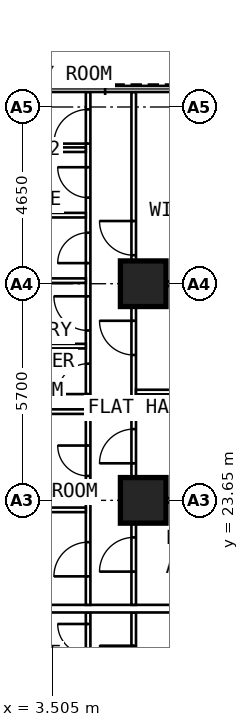
"""IFC4 building model, lengths in metres.
Left out: names, types, materials, properties, quantities, classifications, styles, units other than length and angle.
Written with IfcOpenShell. Run it as: python <this file> out.ifc"""

import sys

from ifc_helpers import new_model, si_unit, direction, frame, frame_2d, origin, origin_2d, place, context, subcontext, project, spatial, rectangle, extrude, element, fill, save


model = new_model("IFC4")
c1 = context("Model", 3, precision=1e-05, world=origin(), true_north=direction((0.0, 1.0)))
c2 = subcontext(c1, "Body", "Model", "MODEL_VIEW")
j1 = project(units=[si_unit("LENGTHUNIT", "METRE"), si_unit("PLANEANGLEUNIT", "RADIAN")], contexts=[c1])
p1 = place(None, origin())
s1 = spatial("IfcSite", under=j1, at=p1, CompositionType="ELEMENT")
p2 = place(p1, origin())
s2 = spatial("IfcBuilding", under=s1, at=p2, CompositionType="ELEMENT")
p3 = place(p2, frame((0.0, 0.0, 80.8)))
s3 = spatial("IfcBuildingStorey", under=s2, at=p3, CompositionType="ELEMENT", Elevation=80.8)
for number, where, z_axis, x_axis in (
    (1, (5.9, 23.65, 0.0), (0.0, 0.0, 1.0), (0.0, 1.0, 0.0)),
    (2, (5.9, 29.35, 0.0), (0.0, 0.0, 1.0), (0.0, 1.0, 0.0)),
):
    element("IfcColumn", number, at=place(p3, frame(where, z_axis=z_axis, x_axis=x_axis)), inside=s3, PredefinedType="COLUMN", context=c2, shape_type="SweptSolid", body=[
        extrude(rectangle(XDim=1.2, YDim=1.2, at=origin_2d()), origin(), (0.0, 0.0, 1.0), 3.6),
    ])
p4 = place(p3, frame((4.45, 10.1, 0.0), z_axis=(0.0, 0.0, 1.0), x_axis=(0.0, 1.0, 0.0)))
e3 = element("IfcWall", 3, at=p4, inside=s3, PredefinedType="PARTITIONING", context=c2, shape_type="SweptSolid", body=[
    extrude(rectangle(XDim=10.6, YDim=0.12, at=frame_2d((5.3, 0.0))), origin(), (0.0, 0.0, 1.0), 3.35),
])
p5 = place(p4, frame((1.59, 0.0, 0.0)))
e4 = element("IfcOpeningElement", 4, at=p5, cuts=e3, PredefinedType="OPENING", context=c2, shape_type="SweptSolid", body=[
    extrude(rectangle(XDim=0.8, YDim=2.1, at=frame_2d((0.4, 1.05))), frame((0.0, 0.072, 0.0), z_axis=(0.0, -1.0, 0.0), x_axis=(1.0, 0.0, 0.0)), (0.0, 0.0, 1.0), 0.144),
])
p6 = place(p4, frame((3.53, 0.0, 0.0)))
e5 = element("IfcOpeningElement", 5, at=p6, cuts=e3, PredefinedType="OPENING", context=c2, shape_type="SweptSolid", body=[
    extrude(rectangle(XDim=0.9, YDim=2.1, at=frame_2d((0.45, 1.05))), frame((0.0, 0.072, 0.0), z_axis=(0.0, -1.0, 0.0), x_axis=(1.0, 0.0, 0.0)), (0.0, 0.0, 1.0), 0.144),
])
p7 = place(p4, frame((5.884, 0.0, 0.0)))
e6 = element("IfcOpeningElement", 6, at=p7, cuts=e3, PredefinedType="OPENING", context=c2, shape_type="SweptSolid", body=[
    extrude(rectangle(XDim=0.8, YDim=2.1, at=frame_2d((0.4, 1.05))), frame((0.0, 0.072, 0.0), z_axis=(0.0, -1.0, 0.0), x_axis=(1.0, 0.0, 0.0)), (0.0, 0.0, 1.0), 0.144),
])
p8 = place(p4, frame((7.842, 0.0, 0.0)))
e7 = element("IfcOpeningElement", 7, at=p8, cuts=e3, PredefinedType="OPENING", context=c2, shape_type="SweptSolid", body=[
    extrude(rectangle(XDim=0.9, YDim=2.1, at=frame_2d((0.45, 1.05))), frame((0.0, 0.072, 0.0), z_axis=(0.0, -1.0, 0.0), x_axis=(1.0, 0.0, 0.0)), (0.0, 0.0, 1.0), 0.144),
])
p9 = place(p4, frame((9.497, 0.0, 0.0)))
e8 = element("IfcOpeningElement", 8, at=p9, cuts=e3, PredefinedType="OPENING", context=c2, shape_type="SweptSolid", body=[
    extrude(rectangle(XDim=0.8, YDim=2.1, at=frame_2d((0.4, 1.05))), frame((0.0, 0.072, 0.0), z_axis=(0.0, -1.0, 0.0), x_axis=(1.0, 0.0, 0.0)), (0.0, 0.0, 1.0), 0.144),
])
p10 = place(p3, frame((5.65, 9.6, 0.0), z_axis=(0.0, 0.0, 1.0), x_axis=(0.0, 1.0, 0.0)))
e9 = element("IfcWall", 9, at=p10, inside=s3, PredefinedType="PARTITIONING", context=c2, shape_type="SweptSolid", body=[
    extrude(rectangle(XDim=11.1, YDim=0.12, at=frame_2d((5.55, 0.0))), origin(), (0.0, 0.0, 1.0), 3.35),
])
p11 = place(p10, frame((1.0, 0.0, 0.0)))
e10 = element("IfcOpeningElement", 10, at=p11, cuts=e9, PredefinedType="OPENING", context=c2, shape_type="SweptSolid", body=[
    extrude(rectangle(XDim=0.9, YDim=2.1, at=frame_2d((0.45, 1.05))), frame((0.0, 0.072, 0.0), z_axis=(0.0, -1.0, 0.0), x_axis=(1.0, 0.0, 0.0)), (0.0, 0.0, 1.0), 0.144),
])
p12 = place(p10, frame((3.625, 0.0, 0.0)))
e11 = element("IfcOpeningElement", 11, at=p12, cuts=e9, PredefinedType="OPENING", context=c2, shape_type="SweptSolid", body=[
    extrude(rectangle(XDim=0.9, YDim=2.1, at=frame_2d((0.45, 1.05))), frame((0.0, 0.072, 0.0), z_axis=(0.0, -1.0, 0.0), x_axis=(1.0, 0.0, 0.0)), (0.0, 0.0, 1.0), 0.144),
])
p13 = place(p10, frame((6.475, 0.0, 0.0)))
e12 = element("IfcOpeningElement", 12, at=p13, cuts=e9, PredefinedType="OPENING", context=c2, shape_type="SweptSolid", body=[
    extrude(rectangle(XDim=0.9, YDim=2.1, at=frame_2d((0.45, 1.05))), frame((0.0, 0.072, 0.0), z_axis=(0.0, -1.0, 0.0), x_axis=(1.0, 0.0, 0.0)), (0.0, 0.0, 1.0), 0.144),
])
p14 = place(p10, frame((9.325, 0.0, 0.0)))
e13 = element("IfcOpeningElement", 13, at=p14, cuts=e9, PredefinedType="OPENING", context=c2, shape_type="SweptSolid", body=[
    extrude(rectangle(XDim=0.9, YDim=2.1, at=frame_2d((0.45, 1.05))), frame((0.0, 0.072, 0.0), z_axis=(0.0, -1.0, 0.0), x_axis=(1.0, 0.0, 0.0)), (0.0, 0.0, 1.0), 0.144),
])
p15 = place(p3, frame((4.45, 20.9, 0.0), z_axis=(0.0, 0.0, 1.0), x_axis=(0.0, 1.0, 0.0)))
e14 = element("IfcWall", 14, at=p15, inside=s3, PredefinedType="PARTITIONING", context=c2, shape_type="SweptSolid", body=[
    extrude(rectangle(XDim=13.495, YDim=0.12, at=frame_2d((6.748, 0.0))), origin(), (0.0, 0.0, 1.0), 3.35),
])
p16 = place(p15, frame((0.75, 0.0, 0.0)))
e15 = element("IfcOpeningElement", 15, at=p16, cuts=e14, PredefinedType="OPENING", context=c2, shape_type="SweptSolid", body=[
    extrude(rectangle(XDim=0.9, YDim=2.1, at=frame_2d((0.45, 1.05))), frame((0.0, 0.072, 0.0), z_axis=(0.0, -1.0, 0.0), x_axis=(1.0, 0.0, 0.0)), (0.0, 0.0, 1.0), 0.144),
])
p17 = place(p15, frame((3.392, 0.0, 0.0)))
e16 = element("IfcOpeningElement", 16, at=p17, cuts=e14, PredefinedType="OPENING", context=c2, shape_type="SweptSolid", body=[
    extrude(rectangle(XDim=0.8, YDim=2.1, at=frame_2d((0.4, 1.05))), frame((0.0, 0.072, 0.0), z_axis=(0.0, -1.0, 0.0), x_axis=(1.0, 0.0, 0.0)), (0.0, 0.0, 1.0), 0.144),
])
p18 = place(p15, frame((5.546, 0.0, 0.0)))
e17 = element("IfcOpeningElement", 17, at=p18, cuts=e14, PredefinedType="OPENING", context=c2, shape_type="SweptSolid", body=[
    extrude(rectangle(XDim=0.8, YDim=2.1, at=frame_2d((0.4, 1.05))), frame((0.0, 0.072, 0.0), z_axis=(0.0, -1.0, 0.0), x_axis=(1.0, 0.0, 0.0)), (0.0, 0.0, 1.0), 0.144),
])
p19 = place(p15, frame((7.219, 0.0, 0.0)))
e18 = element("IfcOpeningElement", 18, at=p19, cuts=e14, PredefinedType="OPENING", context=c2, shape_type="SweptSolid", body=[
    extrude(rectangle(XDim=0.9, YDim=2.1, at=frame_2d((0.45, 1.05))), frame((0.0, 0.072, 0.0), z_axis=(0.0, -1.0, 0.0), x_axis=(1.0, 0.0, 0.0)), (0.0, 0.0, 1.0), 0.144),
])
p20 = place(p15, frame((8.992, 0.0, 0.0)))
e19 = element("IfcOpeningElement", 19, at=p20, cuts=e14, PredefinedType="OPENING", context=c2, shape_type="SweptSolid", body=[
    extrude(rectangle(XDim=0.8, YDim=2.1, at=frame_2d((0.4, 1.05))), frame((0.0, 0.072, 0.0), z_axis=(0.0, -1.0, 0.0), x_axis=(1.0, 0.0, 0.0)), (0.0, 0.0, 1.0), 0.144),
])
p21 = place(p15, frame((10.715, 0.0, 0.0)))
e20 = element("IfcOpeningElement", 20, at=p21, cuts=e14, PredefinedType="OPENING", context=c2, shape_type="SweptSolid", body=[
    extrude(rectangle(XDim=0.8, YDim=2.1, at=frame_2d((0.4, 1.05))), frame((0.0, 0.072, 0.0), z_axis=(0.0, -1.0, 0.0), x_axis=(1.0, 0.0, 0.0)), (0.0, 0.0, 1.0), 0.144),
])
p22 = place(p15, frame((12.137, 0.0, 0.0)))
e21 = element("IfcOpeningElement", 21, at=p22, cuts=e14, PredefinedType="OPENING", context=c2, shape_type="SweptSolid", body=[
    extrude(rectangle(XDim=0.9, YDim=2.1, at=frame_2d((0.45, 1.05))), frame((0.0, 0.072, 0.0), z_axis=(0.0, -1.0, 0.0), x_axis=(1.0, 0.0, 0.0)), (0.0, 0.0, 1.0), 0.144),
])
p23 = place(p3, frame((5.65, 20.9, 0.0), z_axis=(0.0, 0.0, 1.0), x_axis=(0.0, 1.0, 0.0)))
e22 = element("IfcWall", 22, at=p23, inside=s3, PredefinedType="PARTITIONING", context=c2, shape_type="SweptSolid", body=[
    extrude(rectangle(XDim=13.495, YDim=0.12, at=frame_2d((6.748, 0.0))), origin(), (0.0, 0.0, 1.0), 3.35),
])
p24 = place(p23, frame((0.875, 0.0, 0.0)))
e23 = element("IfcOpeningElement", 23, at=p24, cuts=e22, PredefinedType="OPENING", context=c2, shape_type="SweptSolid", body=[
    extrude(rectangle(XDim=0.9, YDim=2.1, at=frame_2d((0.45, 1.05))), frame((0.0, 0.072, 0.0), z_axis=(0.0, -1.0, 0.0), x_axis=(1.0, 0.0, 0.0)), (0.0, 0.0, 1.0), 0.144),
])
p25 = place(p23, frame((3.725, 0.0, 0.0)))
e24 = element("IfcOpeningElement", 24, at=p25, cuts=e22, PredefinedType="OPENING", context=c2, shape_type="SweptSolid", body=[
    extrude(rectangle(XDim=0.9, YDim=2.1, at=frame_2d((0.45, 1.05))), frame((0.0, 0.072, 0.0), z_axis=(0.0, -1.0, 0.0), x_axis=(1.0, 0.0, 0.0)), (0.0, 0.0, 1.0), 0.144),
])
p26 = place(p23, frame((6.575, 0.0, 0.0)))
e25 = element("IfcOpeningElement", 25, at=p26, cuts=e22, PredefinedType="OPENING", context=c2, shape_type="SweptSolid", body=[
    extrude(rectangle(XDim=0.9, YDim=2.1, at=frame_2d((0.45, 1.05))), frame((0.0, 0.072, 0.0), z_axis=(0.0, -1.0, 0.0), x_axis=(1.0, 0.0, 0.0)), (0.0, 0.0, 1.0), 0.144),
])
p27 = place(p23, frame((9.2, 0.0, 0.0)))
e26 = element("IfcOpeningElement", 26, at=p27, cuts=e22, PredefinedType="OPENING", context=c2, shape_type="SweptSolid", body=[
    extrude(rectangle(XDim=0.9, YDim=2.1, at=frame_2d((0.45, 1.05))), frame((0.0, 0.072, 0.0), z_axis=(0.0, -1.0, 0.0), x_axis=(1.0, 0.0, 0.0)), (0.0, 0.0, 1.0), 0.144),
])
p28 = place(p3, frame((5.71, 23.65, 0.0), z_axis=(0.0, 0.0, 1.0), x_axis=(1.0, 0.0, 0.0)))
e27 = element("IfcWall", 27, at=p28, inside=s3, PredefinedType="PARTITIONING", context=c2, shape_type="SweptSolid", body=[
    extrude(rectangle(XDim=4.99, YDim=0.12, at=frame_2d((2.495, 0.0))), origin(), (0.0, 0.0, 1.0), 2.45),
])
p29 = place(p3, frame((5.71, 26.5, 0.0), z_axis=(0.0, 0.0, 1.0), x_axis=(1.0, 0.0, 0.0)))
e28 = element("IfcWall", 28, at=p29, inside=s3, PredefinedType="PARTITIONING", context=c2, shape_type="SweptSolid", body=[
    extrude(rectangle(XDim=4.99, YDim=0.12, at=frame_2d((2.495, 0.0))), origin(), (0.0, 0.0, 1.0), 3.35),
])
p30 = place(p3, frame((5.71, 29.35, 0.0), z_axis=(0.0, 0.0, 1.0), x_axis=(1.0, 0.0, 0.0)))
e29 = element("IfcWall", 29, at=p30, inside=s3, PredefinedType="PARTITIONING", context=c2, shape_type="SweptSolid", body=[
    extrude(rectangle(XDim=4.99, YDim=0.12, at=frame_2d((2.495, 0.0))), origin(), (0.0, 0.0, 1.0), 2.45),
])
p31 = place(p3, frame((2.1, 23.4, 0.0), z_axis=(0.0, 0.0, 1.0), x_axis=(1.0, 0.0, 0.0)))
e30 = element("IfcWall", 30, at=p31, inside=s3, PredefinedType="PARTITIONING", context=c2, shape_type="SweptSolid", body=[
    extrude(rectangle(XDim=2.29, YDim=0.12, at=frame_2d((1.145, 0.0))), origin(), (0.0, 0.0, 1.0), 2.45),
])
for number, where, z_axis, x_axis in (
    (31, (2.1, 25.985, 0.0), (0.0, 0.0, 1.0), (1.0, 0.0, 0.0)),
    (32, (2.1, 27.708, 0.0), (0.0, 0.0, 1.0), (1.0, 0.0, 0.0)),
):
    element("IfcWall", number, at=place(p3, frame(where, z_axis=z_axis, x_axis=x_axis)), inside=s3, PredefinedType="PARTITIONING", context=c2, shape_type="SweptSolid", body=[
        extrude(rectangle(XDim=2.29, YDim=0.12, at=frame_2d((1.145, 0.0))), origin(), (0.0, 0.0, 1.0), 3.35),
    ])
p32 = place(p3, frame((2.1, 29.431, 0.0), z_axis=(0.0, 0.0, 1.0), x_axis=(1.0, 0.0, 0.0)))
e33 = element("IfcWall", 33, at=p32, inside=s3, PredefinedType="PARTITIONING", context=c2, shape_type="SweptSolid", body=[
    extrude(rectangle(XDim=2.29, YDim=0.12, at=frame_2d((1.145, 0.0))), origin(), (0.0, 0.0, 1.0), 2.45),
])
for number, where, z_axis, x_axis in (
    (34, (2.1, 31.154, 0.0), (0.0, 0.0, 1.0), (1.0, 0.0, 0.0)),
    (35, (2.1, 32.877, 0.0), (0.0, 0.0, 1.0), (1.0, 0.0, 0.0)),
):
    element("IfcWall", number, at=place(p3, frame(where, z_axis=z_axis, x_axis=x_axis)), inside=s3, PredefinedType="PARTITIONING", context=c2, shape_type="SweptSolid", body=[
        extrude(rectangle(XDim=2.29, YDim=0.12, at=frame_2d((1.145, 0.0))), origin(), (0.0, 0.0, 1.0), 3.35),
    ])
p33 = place(p3, frame((2.1, 20.8, 0.0), z_axis=(0.0, 0.0, 1.0), x_axis=(1.0, 0.0, 0.0)))
e36 = element("IfcWall", 36, at=p33, inside=s3, PredefinedType="PARTITIONING", context=c2, shape_type="SweptSolid", body=[
    extrude(rectangle(XDim=8.6, YDim=0.2, at=frame_2d((4.3, 0.0))), origin(), (0.0, 0.0, 1.0), 3.35),
])
p34 = place(p14, origin())
e37 = element("IfcDoor", 37, at=p34, inside=s3, OperationType="SINGLE_SWING_RIGHT", PredefinedType="DOOR", context=c2, shape_type="SweptSolid", body=[
    extrude(rectangle(XDim=0.9, YDim=2.1, at=frame_2d((0.45, 1.05))), frame((0.0, 0.025, 0.0), z_axis=(0.0, -1.0, 0.0), x_axis=(1.0, 0.0, 0.0)), (0.0, 0.0, 1.0), 0.05),
])
fill(e13, e37)
p35 = place(p9, origin())
e38 = element("IfcDoor", 38, at=p35, inside=s3, OperationType="SINGLE_SWING_RIGHT", PredefinedType="DOOR", context=c2, shape_type="SweptSolid", body=[
    extrude(rectangle(XDim=0.8, YDim=2.1, at=frame_2d((0.4, 1.05))), frame((0.0, 0.025, 0.0), z_axis=(0.0, -1.0, 0.0), x_axis=(1.0, 0.0, 0.0)), (0.0, 0.0, 1.0), 0.05),
])
fill(e8, e38)
p36 = place(p24, origin())
e39 = element("IfcDoor", 39, at=p36, inside=s3, OperationType="SINGLE_SWING_LEFT", PredefinedType="DOOR", context=c2, shape_type="SweptSolid", body=[
    extrude(rectangle(XDim=0.9, YDim=2.1, at=frame_2d((0.45, 1.05))), frame((0.0, 0.025, 0.0), z_axis=(0.0, -1.0, 0.0), x_axis=(1.0, 0.0, 0.0)), (0.0, 0.0, 1.0), 0.05),
])
fill(e23, e39)
p37 = place(p25, origin())
e40 = element("IfcDoor", 40, at=p37, inside=s3, OperationType="SINGLE_SWING_LEFT", PredefinedType="DOOR", context=c2, shape_type="SweptSolid", body=[
    extrude(rectangle(XDim=0.9, YDim=2.1, at=frame_2d((0.45, 1.05))), frame((0.0, 0.025, 0.0), z_axis=(0.0, -1.0, 0.0), x_axis=(1.0, 0.0, 0.0)), (0.0, 0.0, 1.0), 0.05),
])
fill(e24, e40)
p38 = place(p26, origin())
e41 = element("IfcDoor", 41, at=p38, inside=s3, OperationType="SINGLE_SWING_RIGHT", PredefinedType="DOOR", context=c2, shape_type="SweptSolid", body=[
    extrude(rectangle(XDim=0.9, YDim=2.1, at=frame_2d((0.45, 1.05))), frame((0.0, 0.025, 0.0), z_axis=(0.0, -1.0, 0.0), x_axis=(1.0, 0.0, 0.0)), (0.0, 0.0, 1.0), 0.05),
])
fill(e25, e41)
p39 = place(p27, origin())
e42 = element("IfcDoor", 42, at=p39, inside=s3, OperationType="SINGLE_SWING_RIGHT", PredefinedType="DOOR", context=c2, shape_type="SweptSolid", body=[
    extrude(rectangle(XDim=0.9, YDim=2.1, at=frame_2d((0.45, 1.05))), frame((0.0, 0.025, 0.0), z_axis=(0.0, -1.0, 0.0), x_axis=(1.0, 0.0, 0.0)), (0.0, 0.0, 1.0), 0.05),
])
fill(e26, e42)
p40 = place(p16, origin())
e43 = element("IfcDoor", 43, at=p40, inside=s3, OperationType="SINGLE_SWING_LEFT", PredefinedType="DOOR", context=c2, shape_type="SweptSolid", body=[
    extrude(rectangle(XDim=0.9, YDim=2.1, at=frame_2d((0.45, 1.05))), frame((0.0, 0.025, 0.0), z_axis=(0.0, -1.0, 0.0), x_axis=(1.0, 0.0, 0.0)), (0.0, 0.0, 1.0), 0.05),
])
fill(e15, e43)
p41 = place(p17, origin())
e44 = element("IfcDoor", 44, at=p41, inside=s3, OperationType="SINGLE_SWING_RIGHT", PredefinedType="DOOR", context=c2, shape_type="SweptSolid", body=[
    extrude(rectangle(XDim=0.8, YDim=2.1, at=frame_2d((0.4, 1.05))), frame((0.0, 0.025, 0.0), z_axis=(0.0, -1.0, 0.0), x_axis=(1.0, 0.0, 0.0)), (0.0, 0.0, 1.0), 0.05),
])
fill(e16, e44)
p42 = place(p18, origin())
e45 = element("IfcDoor", 45, at=p42, inside=s3, OperationType="SINGLE_SWING_LEFT", PredefinedType="DOOR", context=c2, shape_type="SweptSolid", body=[
    extrude(rectangle(XDim=0.8, YDim=2.1, at=frame_2d((0.4, 1.05))), frame((0.0, 0.025, 0.0), z_axis=(0.0, -1.0, 0.0), x_axis=(1.0, 0.0, 0.0)), (0.0, 0.0, 1.0), 0.05),
])
fill(e17, e45)
p43 = place(p19, origin())
e46 = element("IfcDoor", 46, at=p43, inside=s3, OperationType="SINGLE_SWING_RIGHT", PredefinedType="DOOR", context=c2, shape_type="SweptSolid", body=[
    extrude(rectangle(XDim=0.9, YDim=2.1, at=frame_2d((0.45, 1.05))), frame((0.0, 0.025, 0.0), z_axis=(0.0, -1.0, 0.0), x_axis=(1.0, 0.0, 0.0)), (0.0, 0.0, 1.0), 0.05),
])
fill(e18, e46)
p44 = place(p20, origin())
e47 = element("IfcDoor", 47, at=p44, inside=s3, OperationType="SINGLE_SWING_LEFT", PredefinedType="DOOR", context=c2, shape_type="SweptSolid", body=[
    extrude(rectangle(XDim=0.8, YDim=2.1, at=frame_2d((0.4, 1.05))), frame((0.0, 0.025, 0.0), z_axis=(0.0, -1.0, 0.0), x_axis=(1.0, 0.0, 0.0)), (0.0, 0.0, 1.0), 0.05),
])
fill(e19, e47)
p45 = place(p21, origin())
e48 = element("IfcDoor", 48, at=p45, inside=s3, OperationType="SINGLE_SWING_RIGHT", PredefinedType="DOOR", context=c2, shape_type="SweptSolid", body=[
    extrude(rectangle(XDim=0.8, YDim=2.1, at=frame_2d((0.4, 1.05))), frame((0.0, 0.025, 0.0), z_axis=(0.0, -1.0, 0.0), x_axis=(1.0, 0.0, 0.0)), (0.0, 0.0, 1.0), 0.05),
])
fill(e20, e48)
p46 = place(p22, origin())
e49 = element("IfcDoor", 49, at=p46, inside=s3, OperationType="SINGLE_SWING_LEFT", PredefinedType="DOOR", context=c2, shape_type="SweptSolid", body=[
    extrude(rectangle(XDim=0.9, YDim=2.1, at=frame_2d((0.45, 1.05))), frame((0.0, 0.025, 0.0), z_axis=(0.0, -1.0, 0.0), x_axis=(1.0, 0.0, 0.0)), (0.0, 0.0, 1.0), 0.05),
])
fill(e21, e49)
save(model, sys.argv[1])
